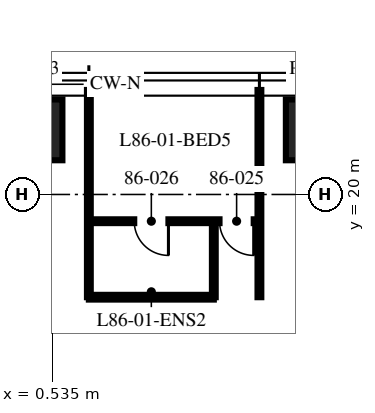
"""IFC4 building model, lengths in metres.
Left out: names, types, materials, properties, quantities, classifications, styles, units other than length and angle.
Written with IfcOpenShell. Run it as: python <this file> out.ifc"""

import sys

from ifc_helpers import new_model, si_unit, direction, frame, frame_2d, origin, origin_2d, place, context, subcontext, project, spatial, rectangle, extrude, element, fill, save


model = new_model("IFC4")
c1 = context("Model", 3, precision=1e-05, world=origin(), true_north=direction((0.0, 1.0)))
c2 = subcontext(c1, "Body", "Model", "MODEL_VIEW")
j1 = project(units=[si_unit("LENGTHUNIT", "METRE"), si_unit("PLANEANGLEUNIT", "RADIAN")], contexts=[c1])
p1 = place(None, origin())
s1 = spatial("IfcSite", under=j1, at=p1, CompositionType="ELEMENT")
p2 = place(p1, origin())
s2 = spatial("IfcBuilding", under=s1, at=p2, CompositionType="ELEMENT")
p3 = place(p2, frame((0.0, 0.0, 342.0)))
s3 = spatial("IfcBuildingStorey", under=s2, at=p3, CompositionType="ELEMENT", Elevation=342.0)
for number, where, z_axis, x_axis in (
    (1, (0.0, 21.7, 0.0), (0.0, 0.0, 1.0), (1.0, 0.0, 0.0)),
    (2, (7.48, 21.7, 0.0), (0.0, 0.0, 1.0), (1.0, 0.0, 0.0)),
):
    element("IfcColumn", number, at=place(p3, frame(where, z_axis=z_axis, x_axis=x_axis)), inside=s3, PredefinedType="COLUMN", context=c2, shape_type="SweptSolid", body=[
        extrude(rectangle(XDim=1.6, YDim=1.6, at=origin_2d()), origin(), (0.0, 0.0, 1.0), 3.75),
    ])
for number, where, z_axis, x_axis in (
    (3, (5.984, 17.296, 0.0), (0.0, 0.0, 1.0), (0.0, 1.0, 0.0)),
    (4, (1.496, 17.296, 0.0), (0.0, 0.0, 1.0), (0.0, 1.0, 0.0)),
):
    element("IfcWall", number, at=place(p3, frame(where, z_axis=z_axis, x_axis=x_axis)), inside=s3, PredefinedType="PARTITIONING", context=c2, shape_type="SweptSolid", body=[
        extrude(rectangle(XDim=5.454, YDim=0.1, at=frame_2d((2.727, 0.0))), origin(), (0.0, 0.0, 1.0), 3.01),
    ])
p4 = place(p3, frame((5.984, 19.296, 0.0), z_axis=(0.0, 0.0, 1.0), x_axis=(-1.0, 0.0, 0.0)))
e5 = element("IfcWall", 5, at=p4, inside=s3, PredefinedType="PARTITIONING", context=c2, shape_type="SweptSolid", body=[
    extrude(rectangle(XDim=4.488, YDim=0.1, at=frame_2d((2.244, 0.0))), origin(), (0.0, 0.0, 1.0), 2.91),
])
p5 = place(p4, frame((0.15, 0.0, 0.0)))
e6 = element("IfcOpeningElement", 6, at=p5, cuts=e5, PredefinedType="OPENING", context=c2, shape_type="SweptSolid", body=[
    extrude(rectangle(XDim=0.9, YDim=2.1, at=frame_2d((0.45, 1.05))), frame((0.0, 0.06, 0.0), z_axis=(0.0, -1.0, 0.0), x_axis=(1.0, 0.0, 0.0)), (0.0, 0.0, 1.0), 0.12),
])
p6 = place(p4, frame((2.394, 0.0, 0.0)))
e7 = element("IfcOpeningElement", 7, at=p6, cuts=e5, PredefinedType="OPENING", context=c2, shape_type="SweptSolid", body=[
    extrude(rectangle(XDim=0.9, YDim=2.1, at=frame_2d((0.45, 1.05))), frame((0.0, 0.06, 0.0), z_axis=(0.0, -1.0, 0.0), x_axis=(1.0, 0.0, 0.0)), (0.0, 0.0, 1.0), 0.12),
])
p7 = place(p3, frame((4.784, 17.296, 0.0), z_axis=(0.0, 0.0, 1.0), x_axis=(0.0, 1.0, 0.0)))
e8 = element("IfcWall", 8, at=p7, inside=s3, PredefinedType="PARTITIONING", context=c2, shape_type="SweptSolid", body=[
    extrude(rectangle(XDim=2.0, YDim=0.1, at=frame_2d((1.0, 0.0))), origin(), (0.0, 0.0, 1.0), 3.5),
])
p8 = place(p3, frame((4.784, 17.296, 0.0), z_axis=(0.0, 0.0, 1.0), x_axis=(-1.0, 0.0, 0.0)))
e9 = element("IfcWall", 9, at=p8, inside=s3, PredefinedType="PARTITIONING", context=c2, shape_type="SweptSolid", body=[
    extrude(rectangle(XDim=3.288, YDim=0.125, at=frame_2d((1.644, 0.0))), origin(), (0.0, 0.0, 1.0), 2.91),
])
p9 = place(p5, origin())
e10 = element("IfcDoor", 10, at=p9, inside=s3, OperationType="SINGLE_SWING_LEFT", PredefinedType="DOOR", context=c2, shape_type="SweptSolid", body=[
    extrude(rectangle(XDim=0.9, YDim=2.1, at=frame_2d((0.45, 1.05))), frame((0.0, 0.025, 0.0), z_axis=(0.0, -1.0, 0.0), x_axis=(1.0, 0.0, 0.0)), (0.0, 0.0, 1.0), 0.05),
])
fill(e6, e10)
p10 = place(p6, origin())
e11 = element("IfcDoor", 11, at=p10, inside=s3, OperationType="SINGLE_SWING_LEFT", PredefinedType="DOOR", context=c2, shape_type="SweptSolid", body=[
    extrude(rectangle(XDim=0.9, YDim=2.1, at=frame_2d((0.45, 1.05))), frame((0.0, 0.025, 0.0), z_axis=(0.0, -1.0, 0.0), x_axis=(1.0, 0.0, 0.0)), (0.0, 0.0, 1.0), 0.05),
])
fill(e7, e11)
save(model, sys.argv[1])
